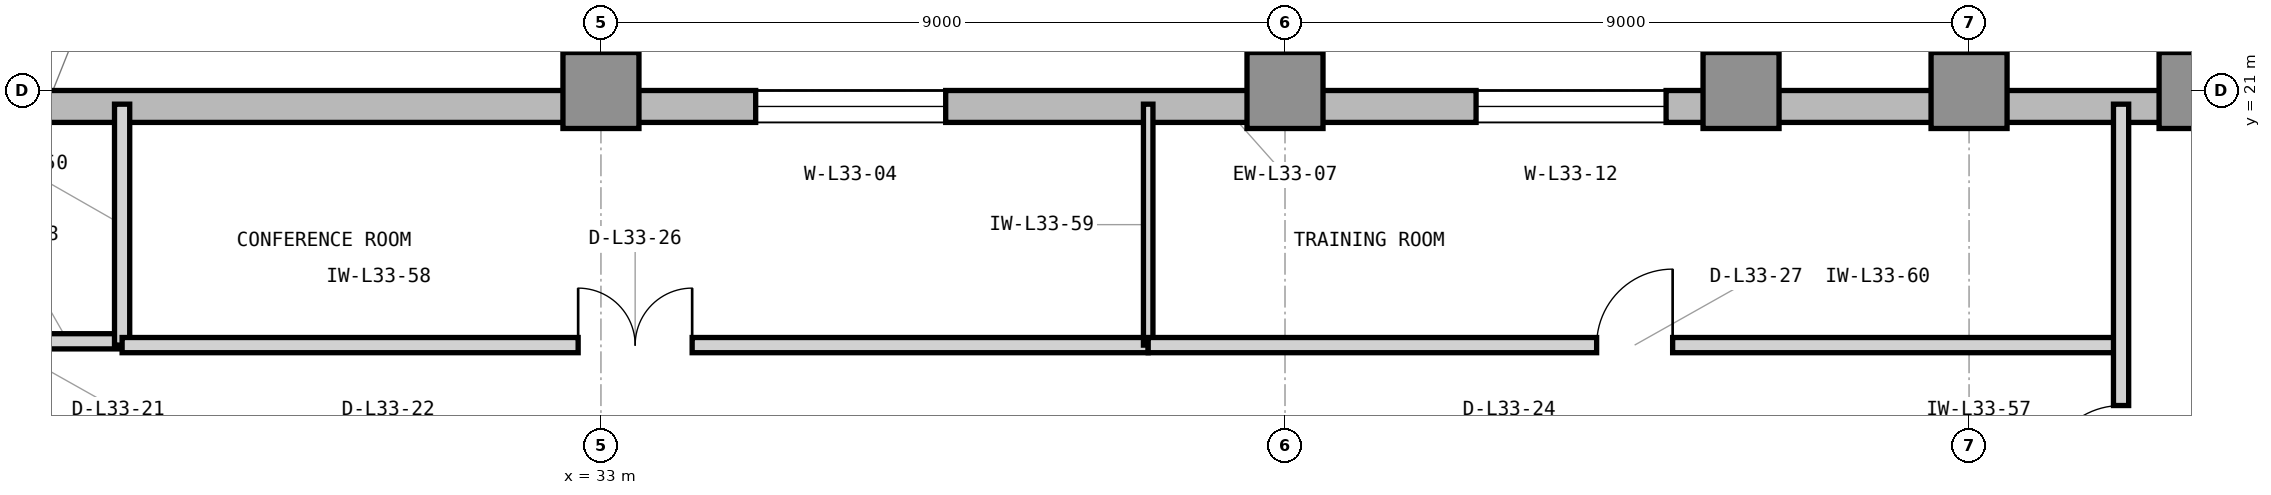
"""IFC4 building model, lengths in metres.
Left out: names, types, materials, properties, quantities, classifications, styles, units other than length and angle.
Written with IfcOpenShell. Run it as: python <this file> out.ifc"""

import sys

from ifc_helpers import new_model, si_unit, direction, frame, frame_2d, origin, origin_2d, place, context, subcontext, project, spatial, rectangle, extrude, element, fill, save


model = new_model("IFC4")
c1 = context("Model", 3, precision=1e-05, world=origin(), true_north=direction((0.0, 1.0)))
c2 = subcontext(c1, "Body", "Model", "MODEL_VIEW")
j1 = project(units=[si_unit("LENGTHUNIT", "METRE"), si_unit("PLANEANGLEUNIT", "RADIAN")], contexts=[c1])
p1 = place(None, origin())
s1 = spatial("IfcSite", under=j1, at=p1, CompositionType="ELEMENT")
p2 = place(p1, origin())
s2 = spatial("IfcBuilding", under=s1, at=p2, CompositionType="ELEMENT")
p3 = place(p2, frame((0.0, 0.0, 140.1)))
s3 = spatial("IfcBuildingStorey", under=s2, at=p3, CompositionType="ELEMENT", Elevation=140.1)
for number, where, z_axis, x_axis in (
    (1, (33.0, 21.0, 0.0), (0.0, 0.0, 1.0), (1.0, 0.0, 0.0)),
    (2, (42.0, 21.0, 0.0), (0.0, 0.0, 1.0), (1.0, 0.0, 0.0)),
    (3, (48.0, 21.0, 0.0), (0.0, 0.0, 1.0), (1.0, 0.0, 0.0)),
    (4, (51.0, 21.0, 0.0), (0.0, 0.0, 1.0), (1.0, 0.0, 0.0)),
    (5, (54.0, 21.0, 0.0), (0.0, 0.0, 1.0), (1.0, 0.0, 0.0)),
):
    element("IfcColumn", number, at=place(p3, frame(where, z_axis=z_axis, x_axis=x_axis)), inside=s3, PredefinedType="COLUMN", context=c2, shape_type="SweptSolid", body=[
        extrude(rectangle(XDim=1.0, YDim=1.0, at=origin_2d()), origin(), (0.0, 0.0, 1.0), 3.9),
    ])
p4 = place(p3, frame((58.4, 20.79, 0.0), z_axis=(0.0, 0.0, 1.0), x_axis=(-1.0, 0.0, 0.0)))
e6 = element("IfcWall", 6, at=p4, inside=s3, PredefinedType="STANDARD", context=c2, shape_type="SweptSolid", body=[
    extrude(rectangle(XDim=34.4, YDim=0.42, at=frame_2d((17.2, 0.0))), origin(), (0.0, 0.0, 1.0), 3.7),
])
p5 = place(p4, frame((20.864, 0.0, 0.85)))
e7 = element("IfcOpeningElement", 7, at=p5, cuts=e6, PredefinedType="OPENING", context=c2, shape_type="SweptSolid", body=[
    extrude(rectangle(XDim=2.5, YDim=2.25, at=frame_2d((1.25, 1.125))), frame((0.0, 0.22, 0.0), z_axis=(0.0, -1.0, 0.0), x_axis=(1.0, 0.0, 0.0)), (0.0, 0.0, 1.0), 0.44),
])
p6 = place(p4, frame((11.386, 0.0, 0.85)))
e8 = element("IfcOpeningElement", 8, at=p6, cuts=e6, PredefinedType="OPENING", context=c2, shape_type="SweptSolid", body=[
    extrude(rectangle(XDim=2.5, YDim=2.25, at=frame_2d((1.25, 1.125))), frame((0.0, 0.22, 0.0), z_axis=(0.0, -1.0, 0.0), x_axis=(1.0, 0.0, 0.0)), (0.0, 0.0, 1.0), 0.44),
])
p7 = place(p3, frame((23.85, 17.7, 0.0), z_axis=(0.0, 0.0, 1.0), x_axis=(1.0, 0.0, 0.0)))
e9 = element("IfcWall", 9, at=p7, inside=s3, PredefinedType="PARTITIONING", context=c2, shape_type="SweptSolid", body=[
    extrude(rectangle(XDim=2.85, YDim=0.2, at=frame_2d((1.425, 0.0))), origin(), (0.0, 0.0, 1.0), 3.69),
])
p8 = place(p7, frame((0.7, 0.0, 0.0)))
e10 = element("IfcOpeningElement", 10, at=p8, cuts=e9, PredefinedType="OPENING", context=c2, shape_type="SweptSolid", body=[
    extrude(rectangle(XDim=1.0, YDim=2.15, at=frame_2d((0.5, 1.075))), frame((0.0, 0.11, 0.0), z_axis=(0.0, -1.0, 0.0), x_axis=(1.0, 0.0, 0.0)), (0.0, 0.0, 1.0), 0.22),
])
p9 = place(p3, frame((26.7, 17.65, 0.0), z_axis=(0.0, 0.0, 1.0), x_axis=(0.0, 1.0, 0.0)))
e11 = element("IfcWall", 11, at=p9, inside=s3, PredefinedType="PARTITIONING", context=c2, shape_type="SweptSolid", body=[
    extrude(rectangle(XDim=3.17, YDim=0.2, at=frame_2d((1.585, 0.0))), origin(), (0.0, 0.0, 1.0), 3.69),
])
p10 = place(p3, frame((26.7, 17.65, 0.0), z_axis=(0.0, 0.0, 1.0), x_axis=(1.0, 0.0, 0.0)))
e12 = element("IfcWall", 12, at=p10, inside=s3, PredefinedType="PARTITIONING", context=c2, shape_type="SweptSolid", body=[
    extrude(rectangle(XDim=13.5, YDim=0.2, at=frame_2d((6.75, 0.0))), origin(), (0.0, 0.0, 1.0), 3.69),
])
p11 = place(p10, frame((6.0, 0.0, 0.0)))
e13 = element("IfcOpeningElement", 13, at=p11, cuts=e12, PredefinedType="OPENING", context=c2, shape_type="SweptSolid", body=[
    extrude(rectangle(XDim=1.5, YDim=2.3, at=frame_2d((0.75, 1.15))), frame((0.0, 0.11, 0.0), z_axis=(0.0, -1.0, 0.0), x_axis=(1.0, 0.0, 0.0)), (0.0, 0.0, 1.0), 0.22),
])
p12 = place(p3, frame((40.2, 17.65, 0.0), z_axis=(0.0, 0.0, 1.0), x_axis=(0.0, 1.0, 0.0)))
e14 = element("IfcWall", 14, at=p12, inside=s3, PredefinedType="PARTITIONING", context=c2, shape_type="SweptSolid", body=[
    extrude(rectangle(XDim=3.17, YDim=0.125, at=frame_2d((1.585, 0.0))), origin(), (0.0, 0.0, 1.0), 3.69),
])
p13 = place(p3, frame((40.2, 17.65, 0.0), z_axis=(0.0, 0.0, 1.0), x_axis=(1.0, 0.0, 0.0)))
e15 = element("IfcWall", 15, at=p13, inside=s3, PredefinedType="PARTITIONING", context=c2, shape_type="SweptSolid", body=[
    extrude(rectangle(XDim=12.8, YDim=0.2, at=frame_2d((6.4, 0.0))), origin(), (0.0, 0.0, 1.0), 3.69),
])
p14 = place(p13, frame((5.9, 0.0, 0.0)))
e16 = element("IfcOpeningElement", 16, at=p14, cuts=e15, PredefinedType="OPENING", context=c2, shape_type="SweptSolid", body=[
    extrude(rectangle(XDim=1.0, YDim=2.15, at=frame_2d((0.5, 1.075))), frame((0.0, 0.11, 0.0), z_axis=(0.0, -1.0, 0.0), x_axis=(1.0, 0.0, 0.0)), (0.0, 0.0, 1.0), 0.22),
])
p15 = place(p3, frame((53.0, 3.18, 0.0), z_axis=(0.0, 0.0, 1.0), x_axis=(0.0, 1.0, 0.0)))
e17 = element("IfcWall", 17, at=p15, inside=s3, PredefinedType="PARTITIONING", context=c2, shape_type="SweptSolid", body=[
    extrude(rectangle(XDim=17.64, YDim=0.2, at=frame_2d((8.82, 0.0))), origin(), (0.0, 0.0, 1.0), 3.69),
])
p16 = place(p15, frame((12.675, 0.0, 0.0)))
e18 = element("IfcOpeningElement", 18, at=p16, cuts=e17, PredefinedType="OPENING", context=c2, shape_type="SweptSolid", body=[
    extrude(rectangle(XDim=1.0, YDim=2.15, at=frame_2d((0.5, 1.075))), frame((0.0, 0.11, 0.0), z_axis=(0.0, -1.0, 0.0), x_axis=(1.0, 0.0, 0.0)), (0.0, 0.0, 1.0), 0.22),
])
p17 = place(p5, origin())
e19 = element("IfcWindow", 19, at=p17, inside=s3, PartitioningType="SINGLE_PANEL", PredefinedType="WINDOW", context=c2, shape_type="SweptSolid", body=[
    extrude(rectangle(XDim=2.5, YDim=2.25, at=frame_2d((1.25, 1.125))), frame((0.0, 0.11, 0.0), z_axis=(0.0, -1.0, 0.0), x_axis=(1.0, 0.0, 0.0)), (0.0, 0.0, 1.0), 0.06),
])
fill(e7, e19)
p18 = place(p11, origin())
e20 = element("IfcDoor", 20, at=p18, inside=s3, OperationType="DOUBLE_DOOR_SINGLE_SWING", PredefinedType="DOOR", context=c2, shape_type="SweptSolid", body=[
    extrude(rectangle(XDim=1.5, YDim=2.3, at=frame_2d((0.75, 1.15))), frame((0.0, 0.025, 0.0), z_axis=(0.0, -1.0, 0.0), x_axis=(1.0, 0.0, 0.0)), (0.0, 0.0, 1.0), 0.05),
])
fill(e13, e20)
p19 = place(p14, origin())
e21 = element("IfcDoor", 21, at=p19, inside=s3, OperationType="SINGLE_SWING_RIGHT", PredefinedType="DOOR", context=c2, shape_type="SweptSolid", body=[
    extrude(rectangle(XDim=1.0, YDim=2.15, at=frame_2d((0.5, 1.075))), frame((0.0, 0.025, 0.0), z_axis=(0.0, -1.0, 0.0), x_axis=(1.0, 0.0, 0.0)), (0.0, 0.0, 1.0), 0.05),
])
fill(e16, e21)
p20 = place(p16, origin())
e22 = element("IfcDoor", 22, at=p20, inside=s3, OperationType="SINGLE_SWING_LEFT", PredefinedType="DOOR", context=c2, shape_type="SweptSolid", body=[
    extrude(rectangle(XDim=1.0, YDim=2.15, at=frame_2d((0.5, 1.075))), frame((0.0, 0.025, 0.0), z_axis=(0.0, -1.0, 0.0), x_axis=(1.0, 0.0, 0.0)), (0.0, 0.0, 1.0), 0.05),
])
fill(e18, e22)
p21 = place(p6, origin())
e23 = element("IfcWindow", 23, at=p21, inside=s3, PartitioningType="SINGLE_PANEL", PredefinedType="WINDOW", context=c2, shape_type="SweptSolid", body=[
    extrude(rectangle(XDim=2.5, YDim=2.25, at=frame_2d((1.25, 1.125))), frame((0.0, 0.11, 0.0), z_axis=(0.0, -1.0, 0.0), x_axis=(1.0, 0.0, 0.0)), (0.0, 0.0, 1.0), 0.06),
])
fill(e8, e23)
save(model, sys.argv[1])
